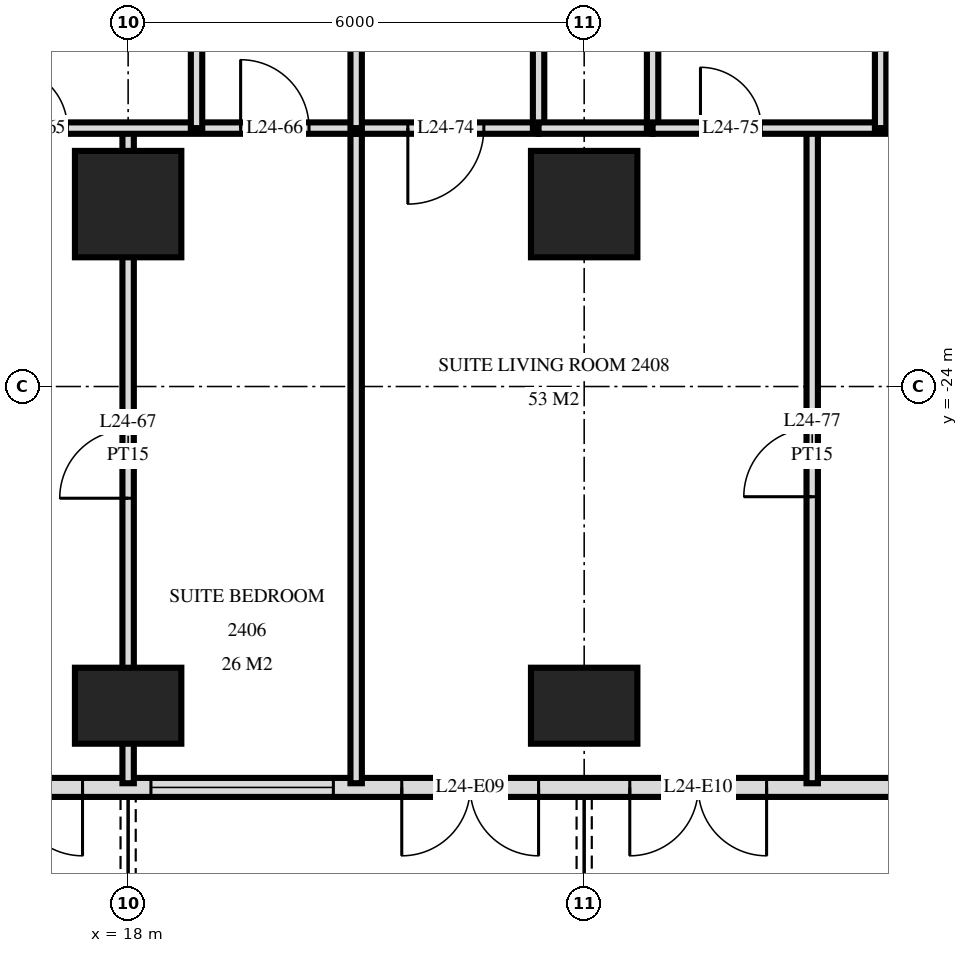
"""IFC4 building model, lengths in metres.
Left out: names, types, materials, properties, quantities, classifications, styles, units other than length and angle.
Written with IfcOpenShell. Run it as: python <this file> out.ifc"""

import sys

from ifc_helpers import new_model, si_unit, direction, frame, frame_2d, origin, origin_2d, place, context, subcontext, project, spatial, rectangle, extrude, element, fill, save


model = new_model("IFC4")
c1 = context("Model", 3, precision=1e-05, world=origin(), true_north=direction((0.0, 1.0)))
c2 = subcontext(c1, "Body", "Model", "MODEL_VIEW")
j1 = project(units=[si_unit("LENGTHUNIT", "METRE"), si_unit("PLANEANGLEUNIT", "RADIAN")], contexts=[c1])
p1 = place(None, origin())
s1 = spatial("IfcSite", under=j1, at=p1, CompositionType="ELEMENT")
p2 = place(p1, origin())
s2 = spatial("IfcBuilding", under=s1, at=p2, CompositionType="ELEMENT")
p3 = place(p2, frame((0.0, 0.0, 96.0)))
s3 = spatial("IfcBuildingStorey", under=s2, at=p3, CompositionType="ELEMENT", Elevation=96.0)
p4 = place(p3, frame((18.0, -28.2, 0.0), z_axis=(0.0, 0.0, 1.0), x_axis=(1.0, 0.0, 0.0)))
e1 = element("IfcColumn", 1, at=p4, inside=s3, PredefinedType="COLUMN", context=c2, shape_type="SweptSolid", body=[
    extrude(rectangle(XDim=1.4, YDim=1.0, at=origin_2d()), origin(), (0.0, 0.0, 1.0), 3.6),
])
p5 = place(p3, frame((18.0, -21.6, 0.0), z_axis=(0.0, 0.0, 1.0), x_axis=(1.0, 0.0, 0.0)))
e2 = element("IfcColumn", 2, at=p5, inside=s3, PredefinedType="COLUMN", context=c2, shape_type="SweptSolid", body=[
    extrude(rectangle(XDim=1.4, YDim=1.4, at=origin_2d()), origin(), (0.0, 0.0, 1.0), 3.6),
])
p6 = place(p3, frame((24.0, -28.2, 0.0), z_axis=(0.0, 0.0, 1.0), x_axis=(1.0, 0.0, 0.0)))
e3 = element("IfcColumn", 3, at=p6, inside=s3, PredefinedType="COLUMN", context=c2, shape_type="SweptSolid", body=[
    extrude(rectangle(XDim=1.4, YDim=1.0, at=origin_2d()), origin(), (0.0, 0.0, 1.0), 3.6),
])
p7 = place(p3, frame((24.0, -21.6, 0.0), z_axis=(0.0, 0.0, 1.0), x_axis=(1.0, 0.0, 0.0)))
e4 = element("IfcColumn", 4, at=p7, inside=s3, PredefinedType="COLUMN", context=c2, shape_type="SweptSolid", body=[
    extrude(rectangle(XDim=1.4, YDim=1.4, at=origin_2d()), origin(), (0.0, 0.0, 1.0), 3.6),
])
p8 = place(p3, frame((-28.775, -29.275, 0.0), z_axis=(0.0, 0.0, 1.0), x_axis=(1.0, 0.0, 0.0)))
e5 = element("IfcWall", 5, at=p8, inside=s3, PredefinedType="SOLIDWALL", context=c2, shape_type="SweptSolid", body=[
    extrude(rectangle(XDim=57.551, YDim=0.25, at=frame_2d((28.775, 0.0))), origin(), (0.0, 0.0, 1.0), 3.32),
])
p9 = place(p8, frame((0.575, 0.0, 0.0)))
e6 = element("IfcOpeningElement", 6, at=p9, cuts=e5, PredefinedType="OPENING", context=c2, shape_type="SweptSolid", body=[
    extrude(rectangle(XDim=1.8, YDim=2.4, at=frame_2d((0.9, 1.2))), frame((0.0, 0.135, 0.0), z_axis=(0.0, -1.0, 0.0), x_axis=(1.0, 0.0, 0.0)), (0.0, 0.0, 1.0), 0.27),
])
p10 = place(p8, frame((5.075, 0.0, 0.3)))
e7 = element("IfcOpeningElement", 7, at=p10, cuts=e5, PredefinedType="OPENING", context=c2, shape_type="SweptSolid", body=[
    extrude(rectangle(XDim=2.4, YDim=2.1, at=frame_2d((1.2, 1.05))), frame((0.0, 0.135, 0.0), z_axis=(0.0, -1.0, 0.0), x_axis=(1.0, 0.0, 0.0)), (0.0, 0.0, 1.0), 0.27),
])
p11 = place(p8, frame((8.375, 0.0, 0.0)))
e8 = element("IfcOpeningElement", 8, at=p11, cuts=e5, PredefinedType="OPENING", context=c2, shape_type="SweptSolid", body=[
    extrude(rectangle(XDim=1.8, YDim=2.4, at=frame_2d((0.9, 1.2))), frame((0.0, 0.135, 0.0), z_axis=(0.0, -1.0, 0.0), x_axis=(1.0, 0.0, 0.0)), (0.0, 0.0, 1.0), 0.27),
])
p12 = place(p8, frame((11.375, 0.0, 0.0)))
e9 = element("IfcOpeningElement", 9, at=p12, cuts=e5, PredefinedType="OPENING", context=c2, shape_type="SweptSolid", body=[
    extrude(rectangle(XDim=1.8, YDim=2.4, at=frame_2d((0.9, 1.2))), frame((0.0, 0.135, 0.0), z_axis=(0.0, -1.0, 0.0), x_axis=(1.0, 0.0, 0.0)), (0.0, 0.0, 1.0), 0.27),
])
p13 = place(p8, frame((14.075, 0.0, 0.3)))
e10 = element("IfcOpeningElement", 10, at=p13, cuts=e5, PredefinedType="OPENING", context=c2, shape_type="SweptSolid", body=[
    extrude(rectangle(XDim=2.4, YDim=2.1, at=frame_2d((1.2, 1.05))), frame((0.0, 0.135, 0.0), z_axis=(0.0, -1.0, 0.0), x_axis=(1.0, 0.0, 0.0)), (0.0, 0.0, 1.0), 0.27),
])
p14 = place(p8, frame((17.375, 0.0, 0.0)))
e11 = element("IfcOpeningElement", 11, at=p14, cuts=e5, PredefinedType="OPENING", context=c2, shape_type="SweptSolid", body=[
    extrude(rectangle(XDim=1.8, YDim=2.4, at=frame_2d((0.9, 1.2))), frame((0.0, 0.135, 0.0), z_axis=(0.0, -1.0, 0.0), x_axis=(1.0, 0.0, 0.0)), (0.0, 0.0, 1.0), 0.27),
])
p15 = place(p8, frame((20.075, 0.0, 0.3)))
e12 = element("IfcOpeningElement", 12, at=p15, cuts=e5, PredefinedType="OPENING", context=c2, shape_type="SweptSolid", body=[
    extrude(rectangle(XDim=2.4, YDim=2.1, at=frame_2d((1.2, 1.05))), frame((0.0, 0.135, 0.0), z_axis=(0.0, -1.0, 0.0), x_axis=(1.0, 0.0, 0.0)), (0.0, 0.0, 1.0), 0.27),
])
p16 = place(p8, frame((23.075, 0.0, 0.3)))
e13 = element("IfcOpeningElement", 13, at=p16, cuts=e5, PredefinedType="OPENING", context=c2, shape_type="SweptSolid", body=[
    extrude(rectangle(XDim=2.4, YDim=2.1, at=frame_2d((1.2, 1.05))), frame((0.0, 0.135, 0.0), z_axis=(0.0, -1.0, 0.0), x_axis=(1.0, 0.0, 0.0)), (0.0, 0.0, 1.0), 0.27),
])
p17 = place(p8, frame((26.375, 0.0, 0.0)))
e14 = element("IfcOpeningElement", 14, at=p17, cuts=e5, PredefinedType="OPENING", context=c2, shape_type="SweptSolid", body=[
    extrude(rectangle(XDim=1.8, YDim=2.4, at=frame_2d((0.9, 1.2))), frame((0.0, 0.135, 0.0), z_axis=(0.0, -1.0, 0.0), x_axis=(1.0, 0.0, 0.0)), (0.0, 0.0, 1.0), 0.27),
])
p18 = place(p8, frame((29.375, 0.0, 0.0)))
e15 = element("IfcOpeningElement", 15, at=p18, cuts=e5, PredefinedType="OPENING", context=c2, shape_type="SweptSolid", body=[
    extrude(rectangle(XDim=1.8, YDim=2.4, at=frame_2d((0.9, 1.2))), frame((0.0, 0.135, 0.0), z_axis=(0.0, -1.0, 0.0), x_axis=(1.0, 0.0, 0.0)), (0.0, 0.0, 1.0), 0.27),
])
p19 = place(p8, frame((32.075, 0.0, 0.3)))
e16 = element("IfcOpeningElement", 16, at=p19, cuts=e5, PredefinedType="OPENING", context=c2, shape_type="SweptSolid", body=[
    extrude(rectangle(XDim=2.4, YDim=2.1, at=frame_2d((1.2, 1.05))), frame((0.0, 0.135, 0.0), z_axis=(0.0, -1.0, 0.0), x_axis=(1.0, 0.0, 0.0)), (0.0, 0.0, 1.0), 0.27),
])
p20 = place(p8, frame((35.375, 0.0, 0.0)))
e17 = element("IfcOpeningElement", 17, at=p20, cuts=e5, PredefinedType="OPENING", context=c2, shape_type="SweptSolid", body=[
    extrude(rectangle(XDim=1.8, YDim=2.4, at=frame_2d((0.9, 1.2))), frame((0.0, 0.135, 0.0), z_axis=(0.0, -1.0, 0.0), x_axis=(1.0, 0.0, 0.0)), (0.0, 0.0, 1.0), 0.27),
])
p21 = place(p8, frame((38.075, 0.0, 0.3)))
e18 = element("IfcOpeningElement", 18, at=p21, cuts=e5, PredefinedType="OPENING", context=c2, shape_type="SweptSolid", body=[
    extrude(rectangle(XDim=2.4, YDim=2.1, at=frame_2d((1.2, 1.05))), frame((0.0, 0.135, 0.0), z_axis=(0.0, -1.0, 0.0), x_axis=(1.0, 0.0, 0.0)), (0.0, 0.0, 1.0), 0.27),
])
p22 = place(p8, frame((41.075, 0.0, 0.3)))
e19 = element("IfcOpeningElement", 19, at=p22, cuts=e5, PredefinedType="OPENING", context=c2, shape_type="SweptSolid", body=[
    extrude(rectangle(XDim=2.4, YDim=2.1, at=frame_2d((1.2, 1.05))), frame((0.0, 0.135, 0.0), z_axis=(0.0, -1.0, 0.0), x_axis=(1.0, 0.0, 0.0)), (0.0, 0.0, 1.0), 0.27),
])
p23 = place(p8, frame((44.375, 0.0, 0.0)))
e20 = element("IfcOpeningElement", 20, at=p23, cuts=e5, PredefinedType="OPENING", context=c2, shape_type="SweptSolid", body=[
    extrude(rectangle(XDim=1.8, YDim=2.4, at=frame_2d((0.9, 1.2))), frame((0.0, 0.135, 0.0), z_axis=(0.0, -1.0, 0.0), x_axis=(1.0, 0.0, 0.0)), (0.0, 0.0, 1.0), 0.27),
])
p24 = place(p8, frame((47.075, 0.0, 0.3)))
e21 = element("IfcOpeningElement", 21, at=p24, cuts=e5, PredefinedType="OPENING", context=c2, shape_type="SweptSolid", body=[
    extrude(rectangle(XDim=2.4, YDim=2.1, at=frame_2d((1.2, 1.05))), frame((0.0, 0.135, 0.0), z_axis=(0.0, -1.0, 0.0), x_axis=(1.0, 0.0, 0.0)), (0.0, 0.0, 1.0), 0.27),
])
p25 = place(p8, frame((50.375, 0.0, 0.0)))
e22 = element("IfcOpeningElement", 22, at=p25, cuts=e5, PredefinedType="OPENING", context=c2, shape_type="SweptSolid", body=[
    extrude(rectangle(XDim=1.8, YDim=2.4, at=frame_2d((0.9, 1.2))), frame((0.0, 0.135, 0.0), z_axis=(0.0, -1.0, 0.0), x_axis=(1.0, 0.0, 0.0)), (0.0, 0.0, 1.0), 0.27),
])
p26 = place(p8, frame((53.375, 0.0, 0.0)))
e23 = element("IfcOpeningElement", 23, at=p26, cuts=e5, PredefinedType="OPENING", context=c2, shape_type="SweptSolid", body=[
    extrude(rectangle(XDim=1.8, YDim=2.4, at=frame_2d((0.9, 1.2))), frame((0.0, 0.135, 0.0), z_axis=(0.0, -1.0, 0.0), x_axis=(1.0, 0.0, 0.0)), (0.0, 0.0, 1.0), 0.27),
])
p27 = place(p3, frame((27.9, -20.6, 0.0), z_axis=(0.0, 0.0, 1.0), x_axis=(0.0, 1.0, 0.0)))
e24 = element("IfcWall", 24, at=p27, inside=s3, PredefinedType="PARTITIONING", context=c2, shape_type="SweptSolid", body=[
    extrude(rectangle(XDim=3.6, YDim=0.15, at=frame_2d((1.8, 0.0))), origin(), (0.0, 0.0, 1.0), 3.32),
])
p28 = place(p3, frame((27.0, -29.22, 0.0), z_axis=(0.0, 0.0, 1.0), x_axis=(0.0, 1.0, 0.0)))
e25 = element("IfcWall", 25, at=p28, inside=s3, PredefinedType="PARTITIONING", context=c2, shape_type="SweptSolid", body=[
    extrude(rectangle(XDim=8.62, YDim=0.15, at=frame_2d((4.31, 0.0))), origin(), (0.0, 0.0, 1.0), 3.32),
])
p29 = place(p28, frame((3.77, 0.0, 0.0)))
e26 = element("IfcOpeningElement", 26, at=p29, cuts=e25, PredefinedType="OPENING", context=c2, shape_type="SweptSolid", body=[
    extrude(rectangle(XDim=0.9, YDim=2.1, at=frame_2d((0.45, 1.05))), frame((0.0, 0.085, 0.0), z_axis=(0.0, -1.0, 0.0), x_axis=(1.0, 0.0, 0.0)), (0.0, 0.0, 1.0), 0.17),
])
p30 = place(p3, frame((24.9, -20.6, 0.0), z_axis=(0.0, 0.0, 1.0), x_axis=(0.0, 1.0, 0.0)))
e27 = element("IfcWall", 27, at=p30, inside=s3, PredefinedType="PLUMBINGWALL", context=c2, shape_type="SweptSolid", body=[
    extrude(rectangle(XDim=3.6, YDim=0.15, at=frame_2d((1.8, 0.0))), origin(), (0.0, 0.0, 1.0), 3.32),
])
p31 = place(p3, frame((23.4, -20.6, 0.0), z_axis=(0.0, 0.0, 1.0), x_axis=(0.0, 1.0, 0.0)))
e28 = element("IfcWall", 28, at=p31, inside=s3, PredefinedType="PARTITIONING", context=c2, shape_type="SweptSolid", body=[
    extrude(rectangle(XDim=3.6, YDim=0.15, at=frame_2d((1.8, 0.0))), origin(), (0.0, 0.0, 1.0), 3.32),
])
p32 = place(p31, frame((1.32, 0.0, 0.0)))
e29 = element("IfcOpeningElement", 29, at=p32, cuts=e28, PredefinedType="OPENING", context=c2, shape_type="SweptSolid", body=[
    extrude(rectangle(XDim=1.0, YDim=2.1, at=frame_2d((0.5, 1.05))), frame((0.0, 0.085, 0.0), z_axis=(0.0, -1.0, 0.0), x_axis=(1.0, 0.0, 0.0)), (0.0, 0.0, 1.0), 0.17),
])
p33 = place(p3, frame((21.0, -20.6, 0.0), z_axis=(0.0, 0.0, 1.0), x_axis=(0.0, 1.0, 0.0)))
e30 = element("IfcWall", 30, at=p33, inside=s3, PredefinedType="PARTITIONING", context=c2, shape_type="SweptSolid", body=[
    extrude(rectangle(XDim=3.6, YDim=0.15, at=frame_2d((1.8, 0.0))), origin(), (0.0, 0.0, 1.0), 3.32),
])
p34 = place(p3, frame((21.0, -29.22, 0.0), z_axis=(0.0, 0.0, 1.0), x_axis=(0.0, 1.0, 0.0)))
e31 = element("IfcWall", 31, at=p34, inside=s3, PredefinedType="PARTITIONING", context=c2, shape_type="SweptSolid", body=[
    extrude(rectangle(XDim=8.62, YDim=0.15, at=frame_2d((4.31, 0.0))), origin(), (0.0, 0.0, 1.0), 3.32),
])
p35 = place(p3, frame((18.9, -20.6, 0.0), z_axis=(0.0, 0.0, 1.0), x_axis=(0.0, 1.0, 0.0)))
e32 = element("IfcWall", 32, at=p35, inside=s3, PredefinedType="PARTITIONING", context=c2, shape_type="SweptSolid", body=[
    extrude(rectangle(XDim=3.6, YDim=0.15, at=frame_2d((1.8, 0.0))), origin(), (0.0, 0.0, 1.0), 3.32),
])
p36 = place(p3, frame((18.0, -29.22, 0.0), z_axis=(0.0, 0.0, 1.0), x_axis=(0.0, 1.0, 0.0)))
e33 = element("IfcWall", 33, at=p36, inside=s3, PredefinedType="PARTITIONING", context=c2, shape_type="SweptSolid", body=[
    extrude(rectangle(XDim=8.62, YDim=0.15, at=frame_2d((4.31, 0.0))), origin(), (0.0, 0.0, 1.0), 3.32),
])
p37 = place(p36, frame((3.75, 0.0, 0.0)))
e34 = element("IfcOpeningElement", 34, at=p37, cuts=e33, PredefinedType="OPENING", context=c2, shape_type="SweptSolid", body=[
    extrude(rectangle(XDim=0.9, YDim=2.1, at=frame_2d((0.45, 1.05))), frame((0.0, 0.085, 0.0), z_axis=(0.0, -1.0, 0.0), x_axis=(1.0, 0.0, 0.0)), (0.0, 0.0, 1.0), 0.17),
])
p38 = place(p3, frame((21.0, -20.6, 0.0), z_axis=(0.0, 0.0, 1.0), x_axis=(1.0, 0.0, 0.0)))
e35 = element("IfcWall", 35, at=p38, inside=s3, PredefinedType="PARTITIONING", context=c2, shape_type="SweptSolid", body=[
    extrude(rectangle(XDim=2.4, YDim=0.15, at=frame_2d((1.2, 0.0))), origin(), (0.0, 0.0, 1.0), 3.32),
])
p39 = place(p38, frame((0.68, 0.0, 0.0)))
e36 = element("IfcOpeningElement", 36, at=p39, cuts=e35, PredefinedType="OPENING", context=c2, shape_type="SweptSolid", body=[
    extrude(rectangle(XDim=1.0, YDim=2.1, at=frame_2d((0.5, 1.05))), frame((0.0, 0.085, 0.0), z_axis=(0.0, -1.0, 0.0), x_axis=(1.0, 0.0, 0.0)), (0.0, 0.0, 1.0), 0.17),
])
p40 = place(p3, frame((15.9, -20.6, 0.0), z_axis=(0.0, 0.0, 1.0), x_axis=(1.0, 0.0, 0.0)))
e37 = element("IfcWall", 37, at=p40, inside=s3, PredefinedType="PARTITIONING", context=c2, shape_type="SweptSolid", body=[
    extrude(rectangle(XDim=5.1, YDim=0.15, at=frame_2d((2.55, 0.0))), origin(), (0.0, 0.0, 1.0), 3.32),
])
p41 = place(p40, frame((0.5, 0.0, 0.0)))
e38 = element("IfcOpeningElement", 38, at=p41, cuts=e37, PredefinedType="OPENING", context=c2, shape_type="SweptSolid", body=[
    extrude(rectangle(XDim=0.8, YDim=2.1, at=frame_2d((0.4, 1.05))), frame((0.0, 0.085, 0.0), z_axis=(0.0, -1.0, 0.0), x_axis=(1.0, 0.0, 0.0)), (0.0, 0.0, 1.0), 0.17),
])
p42 = place(p40, frame((3.58, 0.0, 0.0)))
e39 = element("IfcOpeningElement", 39, at=p42, cuts=e37, PredefinedType="OPENING", context=c2, shape_type="SweptSolid", body=[
    extrude(rectangle(XDim=0.9, YDim=2.1, at=frame_2d((0.45, 1.05))), frame((0.0, 0.085, 0.0), z_axis=(0.0, -1.0, 0.0), x_axis=(1.0, 0.0, 0.0)), (0.0, 0.0, 1.0), 0.17),
])
p43 = place(p3, frame((24.9, -20.6, 0.0), z_axis=(0.0, 0.0, 1.0), x_axis=(1.0, 0.0, 0.0)))
e40 = element("IfcWall", 40, at=p43, inside=s3, PredefinedType="PARTITIONING", context=c2, shape_type="SweptSolid", body=[
    extrude(rectangle(XDim=8.22, YDim=0.15, at=frame_2d((4.11, 0.0))), origin(), (0.0, 0.0, 1.0), 3.32),
])
p44 = place(p43, frame((0.63, 0.0, 0.0)))
e41 = element("IfcOpeningElement", 41, at=p44, cuts=e40, PredefinedType="OPENING", context=c2, shape_type="SweptSolid", body=[
    extrude(rectangle(XDim=0.8, YDim=2.1, at=frame_2d((0.4, 1.05))), frame((0.0, 0.085, 0.0), z_axis=(0.0, -1.0, 0.0), x_axis=(1.0, 0.0, 0.0)), (0.0, 0.0, 1.0), 0.17),
])
p45 = place(p43, frame((3.4, 0.0, 0.0)))
e42 = element("IfcOpeningElement", 42, at=p45, cuts=e40, PredefinedType="OPENING", context=c2, shape_type="SweptSolid", body=[
    extrude(rectangle(XDim=0.9, YDim=2.1, at=frame_2d((0.45, 1.05))), frame((0.0, 0.085, 0.0), z_axis=(0.0, -1.0, 0.0), x_axis=(1.0, 0.0, 0.0)), (0.0, 0.0, 1.0), 0.17),
])
p46 = place(p3, frame((23.4, -20.6, 0.0), z_axis=(0.0, 0.0, 1.0), x_axis=(1.0, 0.0, 0.0)))
e43 = element("IfcWall", 43, at=p46, inside=s3, PredefinedType="PLUMBINGWALL", context=c2, shape_type="SweptSolid", body=[
    extrude(rectangle(XDim=1.5, YDim=0.15, at=frame_2d((0.75, 0.0))), origin(), (0.0, 0.0, 1.0), 3.32),
])
p47 = place(p23, frame((0.9, 0.0, 0.0), z_axis=(0.0, 0.0, 1.0), x_axis=(-1.0, 0.0, 0.0)))
e44 = element("IfcDoor", 44, at=p47, inside=s3, OperationType="DOUBLE_DOOR_SINGLE_SWING", PredefinedType="DOOR", context=c2, shape_type="SweptSolid", body=[
    extrude(rectangle(XDim=1.8, YDim=2.4, at=frame_2d((0.0, 1.2))), frame((0.0, -0.025, 0.0), z_axis=(0.0, 1.0, 0.0), x_axis=(-1.0, 0.0, 0.0)), (0.0, 0.0, 1.0), 0.05),
])
fill(e20, e44)
p48 = place(p24, origin())
e45 = element("IfcWindow", 45, at=p48, inside=s3, PartitioningType="SINGLE_PANEL", PredefinedType="WINDOW", context=c2, shape_type="SweptSolid", body=[
    extrude(rectangle(XDim=2.4, YDim=2.1, at=frame_2d((1.2, 1.05))), frame((0.0, 0.03, 0.0), z_axis=(0.0, -1.0, 0.0), x_axis=(1.0, 0.0, 0.0)), (0.0, 0.0, 1.0), 0.06),
])
fill(e21, e45)
p49 = place(p25, frame((0.9, 0.0, 0.0), z_axis=(0.0, 0.0, 1.0), x_axis=(-1.0, 0.0, 0.0)))
e46 = element("IfcDoor", 46, at=p49, inside=s3, OperationType="DOUBLE_DOOR_SINGLE_SWING", PredefinedType="DOOR", context=c2, shape_type="SweptSolid", body=[
    extrude(rectangle(XDim=1.8, YDim=2.4, at=frame_2d((0.0, 1.2))), frame((0.0, -0.025, 0.0), z_axis=(0.0, 1.0, 0.0), x_axis=(-1.0, 0.0, 0.0)), (0.0, 0.0, 1.0), 0.05),
])
fill(e22, e46)
p50 = place(p26, frame((0.9, 0.0, 0.0), z_axis=(0.0, 0.0, 1.0), x_axis=(-1.0, 0.0, 0.0)))
e47 = element("IfcDoor", 47, at=p50, inside=s3, OperationType="DOUBLE_DOOR_SINGLE_SWING", PredefinedType="DOOR", context=c2, shape_type="SweptSolid", body=[
    extrude(rectangle(XDim=1.8, YDim=2.4, at=frame_2d((0.0, 1.2))), frame((0.0, -0.025, 0.0), z_axis=(0.0, 1.0, 0.0), x_axis=(-1.0, 0.0, 0.0)), (0.0, 0.0, 1.0), 0.05),
])
fill(e23, e47)
p51 = place(p41, origin())
e48 = element("IfcDoor", 48, at=p51, inside=s3, OperationType="SINGLE_SWING_RIGHT", PredefinedType="DOOR", context=c2, shape_type="SweptSolid", body=[
    extrude(rectangle(XDim=0.8, YDim=2.1, at=frame_2d((0.4, 1.05))), frame((0.0, 0.025, 0.0), z_axis=(0.0, -1.0, 0.0), x_axis=(1.0, 0.0, 0.0)), (0.0, 0.0, 1.0), 0.05),
])
fill(e38, e48)
p52 = place(p42, origin())
e49 = element("IfcDoor", 49, at=p52, inside=s3, OperationType="SINGLE_SWING_RIGHT", PredefinedType="DOOR", context=c2, shape_type="SweptSolid", body=[
    extrude(rectangle(XDim=0.9, YDim=2.1, at=frame_2d((0.45, 1.05))), frame((0.0, 0.025, 0.0), z_axis=(0.0, -1.0, 0.0), x_axis=(1.0, 0.0, 0.0)), (0.0, 0.0, 1.0), 0.05),
])
fill(e39, e49)
p53 = place(p37, origin())
e50 = element("IfcDoor", 50, at=p53, inside=s3, OperationType="SINGLE_SWING_RIGHT", PredefinedType="DOOR", context=c2, shape_type="SweptSolid", body=[
    extrude(rectangle(XDim=0.9, YDim=2.1, at=frame_2d((0.45, 1.05))), frame((0.0, 0.025, 0.0), z_axis=(0.0, -1.0, 0.0), x_axis=(1.0, 0.0, 0.0)), (0.0, 0.0, 1.0), 0.05),
])
fill(e34, e50)
p54 = place(p39, frame((0.5, 0.0, 0.0), z_axis=(0.0, 0.0, 1.0), x_axis=(-1.0, 0.0, 0.0)))
e51 = element("IfcDoor", 51, at=p54, inside=s3, OperationType="SINGLE_SWING_LEFT", PredefinedType="DOOR", context=c2, shape_type="SweptSolid", body=[
    extrude(rectangle(XDim=1.0, YDim=2.1, at=frame_2d((0.0, 1.05))), frame((0.0, -0.025, 0.0), z_axis=(0.0, 1.0, 0.0), x_axis=(-1.0, 0.0, 0.0)), (0.0, 0.0, 1.0), 0.05),
])
fill(e36, e51)
p55 = place(p44, origin())
e52 = element("IfcDoor", 52, at=p55, inside=s3, OperationType="SINGLE_SWING_RIGHT", PredefinedType="DOOR", context=c2, shape_type="SweptSolid", body=[
    extrude(rectangle(XDim=0.8, YDim=2.1, at=frame_2d((0.4, 1.05))), frame((0.0, 0.025, 0.0), z_axis=(0.0, -1.0, 0.0), x_axis=(1.0, 0.0, 0.0)), (0.0, 0.0, 1.0), 0.05),
])
fill(e41, e52)
p56 = place(p29, origin())
e53 = element("IfcDoor", 53, at=p56, inside=s3, OperationType="SINGLE_SWING_RIGHT", PredefinedType="DOOR", context=c2, shape_type="SweptSolid", body=[
    extrude(rectangle(XDim=0.9, YDim=2.1, at=frame_2d((0.45, 1.05))), frame((0.0, 0.025, 0.0), z_axis=(0.0, -1.0, 0.0), x_axis=(1.0, 0.0, 0.0)), (0.0, 0.0, 1.0), 0.05),
])
fill(e26, e53)
save(model, sys.argv[1])
